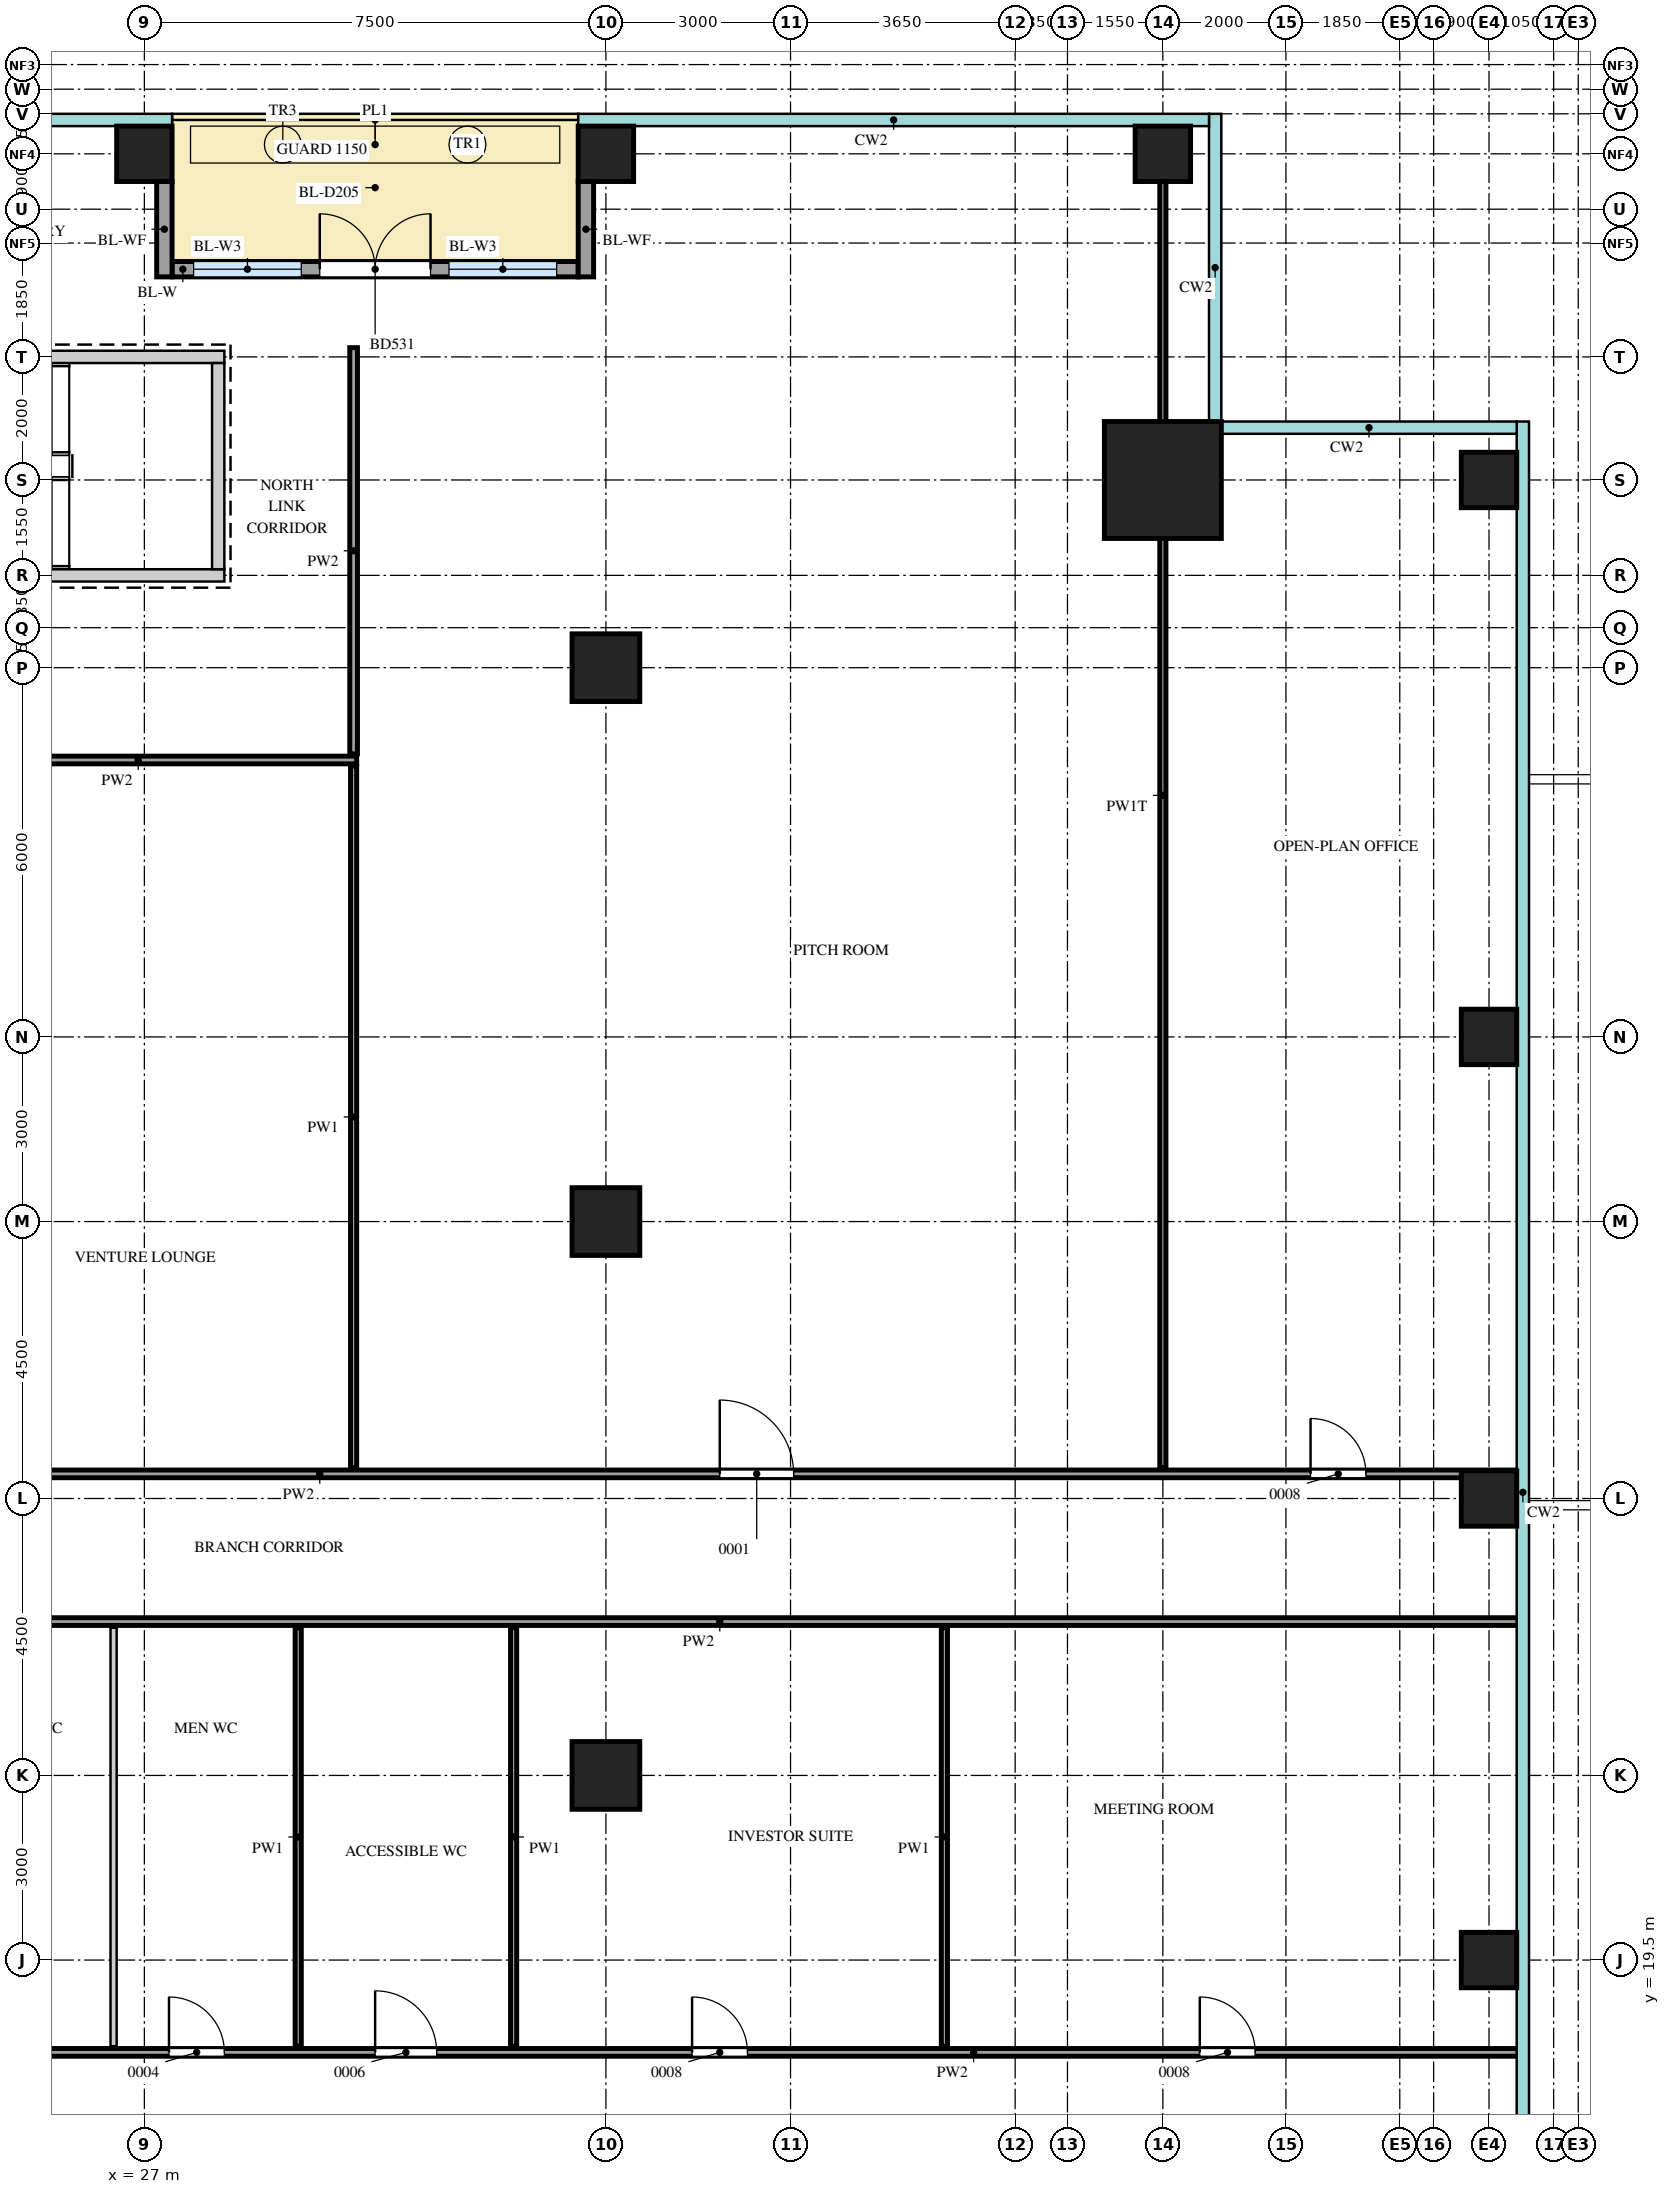
"""IFC4 building model, lengths in metres.
Left out: names, types, materials, properties, quantities, classifications, styles, units other than length and angle.
Written with IfcOpenShell. Run it as: python <this file> out.ifc"""

import sys

from ifc_helpers import new_model, si_unit, direction, frame, frame_2d, origin, origin_2d, place, context, subcontext, project, spatial, rectangle, extrude, source, transform, mapped, element, fill, save


model = new_model("IFC4")
c1 = context("Model", 3, precision=1e-05, world=origin(), true_north=direction((0.0, 1.0)))
c2 = subcontext(c1, "Body", "Model", "MODEL_VIEW")
j1 = project(units=[si_unit("LENGTHUNIT", "METRE"), si_unit("PLANEANGLEUNIT", "RADIAN")], contexts=[c1])
p1 = place(None, origin())
s1 = spatial("IfcSite", under=j1, at=p1, CompositionType="ELEMENT")
p2 = place(p1, origin())
s2 = spatial("IfcBuilding", under=s1, at=p2, CompositionType="ELEMENT")
p3 = place(p2, frame((0.0, 0.0, 238.2)))
s3 = spatial("IfcBuildingStorey", under=s2, at=p3, CompositionType="ELEMENT", Elevation=238.2)
m1 = source(origin(), c2, "Body", "SweptSolid", [
    extrude(rectangle(XDim=7.1, YDim=0.2, at=frame_2d((3.55, 0.0))), origin(), (0.0, 0.0, 1.0), 3.75),
])
p4 = place(p3, frame((21.2, 45.55, 0.0), z_axis=(0.0, 0.0, 1.0), x_axis=(1.0, 0.0, 0.0)))
e1 = element("IfcWall", 1, at=p4, inside=s3, PredefinedType="SHEAR", context=c2, shape_type="MappedRepresentation", body=[
    mapped(m1, transform((0.0, 0.0, 0.0))),
])
m2 = source(origin(), c2, "Body", "SweptSolid", [
    extrude(rectangle(XDim=1.2, YDim=2.1, at=frame_2d((0.6, 1.05))), frame((0.0, 0.11, 0.0), z_axis=(0.0, -1.0, 0.0), x_axis=(1.0, 0.0, 0.0)), (0.0, 0.0, 1.0), 0.22),
])
p5 = place(p4, frame((0.15, 0.0, 0.0)))
e2 = element("IfcOpeningElement", 2, at=p5, cuts=e1, PredefinedType="OPENING", context=c2, shape_type="MappedRepresentation", body=[
    mapped(m2, transform((0.0, 0.0, 0.0))),
])
p6 = place(p3, frame((21.2, 42.0, 0.0), z_axis=(0.0, 0.0, 1.0), x_axis=(1.0, 0.0, 0.0)))
e3 = element("IfcWall", 3, at=p6, inside=s3, PredefinedType="SHEAR", context=c2, shape_type="MappedRepresentation", body=[
    mapped(m1, transform((0.0, 0.0, 0.0))),
])
m3 = source(origin(), c2, "Body", "SweptSolid", [
    extrude(rectangle(XDim=3.35, YDim=0.2, at=frame_2d((1.675, 0.0))), origin(), (0.0, 0.0, 1.0), 3.75),
])
p7 = place(p3, frame((28.2, 42.1, 0.0), z_axis=(0.0, 0.0, 1.0), x_axis=(0.0, 1.0, 0.0)))
e4 = element("IfcWall", 4, at=p7, inside=s3, PredefinedType="SHEAR", context=c2, shape_type="MappedRepresentation", body=[
    mapped(m3, transform((0.0, 0.0, 0.0))),
])
m4 = source(origin(), c2, "Body", "SweptSolid", [
    extrude(rectangle(XDim=1.9, YDim=1.9, at=origin_2d()), origin(), (0.0, 0.0, 1.0), 4.0),
])
p8 = place(p3, frame((43.55, 43.55, 0.0), z_axis=(0.0, 0.0, 1.0), x_axis=(1.0, 0.0, 0.0)))
e5 = element("IfcColumn", 5, at=p8, inside=s3, PredefinedType="COLUMN", context=c2, shape_type="MappedRepresentation", body=[
    mapped(m4, transform((0.0, 0.0, 0.0))),
])
m5 = source(origin(), c2, "Body", "SweptSolid", [
    extrude(rectangle(XDim=0.9, YDim=0.9, at=origin_2d()), origin(), (0.0, 0.0, 1.0), 3.75),
])
for number, where, z_axis, x_axis in (
    (6, (48.85, 19.5, 0.0), (0.0, 0.0, 1.0), (1.0, 0.0, 0.0)),
    (7, (48.85, 27.0, 0.0), (0.0, 0.0, 1.0), (1.0, 0.0, 0.0)),
    (8, (48.85, 34.5, 0.0), (0.0, 0.0, 1.0), (1.0, 0.0, 0.0)),
    (9, (48.85, 43.55, 0.0), (0.0, 0.0, 1.0), (1.0, 0.0, 0.0)),
    (10, (27.0, 48.85, 0.0), (0.0, 0.0, 1.0), (1.0, 0.0, 0.0)),
    (11, (34.5, 48.85, 0.0), (0.0, 0.0, 1.0), (1.0, 0.0, 0.0)),
    (12, (43.55, 48.85, 0.0), (0.0, 0.0, 1.0), (1.0, 0.0, 0.0)),
):
    element("IfcColumn", number, at=place(p3, frame(where, z_axis=z_axis, x_axis=x_axis)), inside=s3, PredefinedType="COLUMN", context=c2, shape_type="MappedRepresentation", body=[
        mapped(m5, transform((0.0, 0.0, 0.0))),
    ])
m6 = source(origin(), c2, "Body", "SweptSolid", [
    extrude(rectangle(XDim=1.1, YDim=1.1, at=origin_2d()), origin(), (0.0, 0.0, 1.0), 3.75),
])
for number, where, z_axis, x_axis in (
    (13, (34.5, 22.5, 0.0), (0.0, 0.0, 1.0), (1.0, 0.0, 0.0)),
    (14, (34.5, 31.5, 0.0), (0.0, 0.0, 1.0), (1.0, 0.0, 0.0)),
    (15, (34.5, 40.5, 0.0), (0.0, 0.0, 1.0), (1.0, 0.0, 0.0)),
):
    element("IfcColumn", number, at=place(p3, frame(where, z_axis=z_axis, x_axis=x_axis)), inside=s3, PredefinedType="COLUMN", context=c2, shape_type="MappedRepresentation", body=[
        mapped(m6, transform((0.0, 0.0, 0.0))),
    ])
m7 = source(origin(), c2, "Body", "SweptSolid", [
    extrude(rectangle(XDim=6.6, YDim=0.25, at=frame_2d((3.3, 0.0))), origin(), (0.0, 0.0, 1.0), 3.75),
])
p9 = place(p3, frame((27.45, 46.975, 0.0), z_axis=(0.0, 0.0, 1.0), x_axis=(1.0, 0.0, 0.0)))
e16 = element("IfcWall", 16, at=p9, inside=s3, PredefinedType="SOLIDWALL", context=c2, shape_type="MappedRepresentation", body=[
    mapped(m7, transform((0.0, 0.0, 0.0))),
])
m8 = source(origin(), c2, "Body", "SweptSolid", [
    extrude(rectangle(XDim=1.75, YDim=2.4, at=frame_2d((0.875, 1.2))), frame((0.0, 0.135, 0.0), z_axis=(0.0, -1.0, 0.0), x_axis=(1.0, 0.0, 0.0)), (0.0, 0.0, 1.0), 0.27),
])
p10 = place(p9, frame((0.35, 0.0, 0.0)))
e17 = element("IfcOpeningElement", 17, at=p10, cuts=e16, PredefinedType="OPENING", context=c2, shape_type="MappedRepresentation", body=[
    mapped(m8, transform((0.0, 0.0, 0.0))),
])
p11 = place(p9, frame((4.5, 0.0, 0.0)))
e18 = element("IfcOpeningElement", 18, at=p11, cuts=e16, PredefinedType="OPENING", context=c2, shape_type="MappedRepresentation", body=[
    mapped(m8, transform((0.0, 0.0, 0.0))),
])
m9 = source(origin(), c2, "Body", "SweptSolid", [
    extrude(rectangle(XDim=1.8, YDim=2.4, at=frame_2d((0.9, 1.2))), frame((0.0, 0.135, 0.0), z_axis=(0.0, -1.0, 0.0), x_axis=(1.0, 0.0, 0.0)), (0.0, 0.0, 1.0), 0.27),
])
p12 = place(p9, frame((2.4, 0.0, 0.0)))
e19 = element("IfcOpeningElement", 19, at=p12, cuts=e16, PredefinedType="OPENING", context=c2, shape_type="MappedRepresentation", body=[
    mapped(m9, transform((0.0, 0.0, 0.0))),
])
m10 = source(origin(), c2, "Body", "SweptSolid", [
    extrude(rectangle(XDim=1.55, YDim=0.25, at=frame_2d((0.775, 0.0))), origin(), (0.0, 0.0, 1.0), 3.45),
])
for number, where, z_axis, x_axis in (
    (20, (27.325, 48.4, 0.0), (0.0, 0.0, 1.0), (0.0, -1.0, 0.0)),
    (21, (34.175, 48.4, 0.0), (0.0, 0.0, 1.0), (0.0, -1.0, 0.0)),
):
    element("IfcWall", number, at=place(p3, frame(where, z_axis=z_axis, x_axis=x_axis)), inside=s3, PredefinedType="SOLIDWALL", context=c2, shape_type="MappedRepresentation", body=[
        mapped(m10, transform((0.0, 0.0, 0.0))),
    ])
m11 = source(origin(), c2, "Body", "SweptSolid", [
    extrude(rectangle(XDim=26.0, YDim=0.125, at=frame_2d((13.0, 0.0))), origin(), (0.0, 0.0, 1.0), 3.8),
])
p13 = place(p3, frame((23.35, 18.0, 0.0), z_axis=(0.0, 0.0, 1.0), x_axis=(1.0, 0.0, 0.0)))
e22 = element("IfcWall", 22, at=p13, inside=s3, PredefinedType="PARTITIONING", context=c2, shape_type="MappedRepresentation", body=[
    mapped(m11, transform((0.0, 0.0, 0.0))),
])
m12 = source(origin(), c2, "Body", "SweptSolid", [
    extrude(rectangle(XDim=0.9, YDim=2.1, at=frame_2d((0.45, 1.05))), frame((0.0, 0.073, 0.0), z_axis=(0.0, -1.0, 0.0), x_axis=(1.0, 0.0, 0.0)), (0.0, 0.0, 1.0), 0.145),
])
p14 = place(p13, frame((4.05, 0.0, 0.0)))
e23 = element("IfcOpeningElement", 23, at=p14, cuts=e22, PredefinedType="OPENING", context=c2, shape_type="MappedRepresentation", body=[
    mapped(m12, transform((0.0, 0.0, 0.0))),
])
m13 = source(origin(), c2, "Body", "SweptSolid", [
    extrude(rectangle(XDim=1.0, YDim=2.1, at=frame_2d((0.5, 1.05))), frame((0.0, 0.073, 0.0), z_axis=(0.0, -1.0, 0.0), x_axis=(1.0, 0.0, 0.0)), (0.0, 0.0, 1.0), 0.145),
])
p15 = place(p13, frame((7.4, 0.0, 0.0)))
e24 = element("IfcOpeningElement", 24, at=p15, cuts=e22, PredefinedType="OPENING", context=c2, shape_type="MappedRepresentation", body=[
    mapped(m13, transform((0.0, 0.0, 0.0))),
])
p16 = place(p13, frame((12.55, 0.0, 0.0)))
e25 = element("IfcOpeningElement", 25, at=p16, cuts=e22, PredefinedType="OPENING", context=c2, shape_type="MappedRepresentation", body=[
    mapped(m12, transform((0.0, 0.0, 0.0))),
])
p17 = place(p13, frame((20.8, 0.0, 0.0)))
e26 = element("IfcOpeningElement", 26, at=p17, cuts=e22, PredefinedType="OPENING", context=c2, shape_type="MappedRepresentation", body=[
    mapped(m12, transform((0.0, 0.0, 0.0))),
])
m14 = source(origin(), c2, "Body", "SweptSolid", [
    extrude(rectangle(XDim=6.8, YDim=0.1, at=frame_2d((3.4, 0.0))), origin(), (0.0, 0.0, 1.0), 3.8),
])
for number, where, z_axis, x_axis in (
    (27, (26.5, 18.1, 0.0), (0.0, 0.0, 1.0), (0.0, 1.0, 0.0)),
    (28, (29.5, 18.1, 0.0), (0.0, 0.0, 1.0), (0.0, 1.0, 0.0)),
    (29, (33.0, 18.1, 0.0), (0.0, 0.0, 1.0), (0.0, 1.0, 0.0)),
    (30, (40.0, 18.1, 0.0), (0.0, 0.0, 1.0), (0.0, 1.0, 0.0)),
):
    element("IfcWall", number, at=place(p3, frame(where, z_axis=z_axis, x_axis=x_axis)), inside=s3, PredefinedType="PARTITIONING", context=c2, shape_type="MappedRepresentation", body=[
        mapped(m14, transform((0.0, 0.0, 0.0))),
    ])
p18 = place(p3, frame((23.35, 25.0, 0.0), z_axis=(0.0, 0.0, 1.0), x_axis=(1.0, 0.0, 0.0)))
e31 = element("IfcWall", 31, at=p18, inside=s3, PredefinedType="PARTITIONING", context=c2, shape_type="MappedRepresentation", body=[
    mapped(m11, transform((0.0, 0.0, 0.0))),
])
p19 = place(p3, frame((23.35, 27.4, 0.0), z_axis=(0.0, 0.0, 1.0), x_axis=(1.0, 0.0, 0.0)))
e32 = element("IfcWall", 32, at=p19, inside=s3, PredefinedType="PARTITIONING", context=c2, shape_type="MappedRepresentation", body=[
    mapped(m11, transform((0.0, 0.0, 0.0))),
])
m15 = source(origin(), c2, "Body", "SweptSolid", [
    extrude(rectangle(XDim=1.2, YDim=2.1, at=frame_2d((0.6, 1.05))), frame((0.0, 0.073, 0.0), z_axis=(0.0, -1.0, 0.0), x_axis=(1.0, 0.0, 0.0)), (0.0, 0.0, 1.0), 0.145),
])
p20 = place(p19, frame((13.0, 0.0, 0.0)))
e33 = element("IfcOpeningElement", 33, at=p20, cuts=e32, PredefinedType="OPENING", context=c2, shape_type="MappedRepresentation", body=[
    mapped(m15, transform((0.0, 0.0, 0.0))),
])
p21 = place(p19, frame((22.6, 0.0, 0.0)))
e34 = element("IfcOpeningElement", 34, at=p21, cuts=e32, PredefinedType="OPENING", context=c2, shape_type="MappedRepresentation", body=[
    mapped(m12, transform((0.0, 0.0, 0.0))),
])
m16 = source(origin(), c2, "Body", "SweptSolid", [
    extrude(rectangle(XDim=11.4, YDim=0.1, at=frame_2d((5.7, 0.0))), origin(), (0.0, 0.0, 1.0), 3.8),
])
p22 = place(p3, frame((30.4, 27.5, 0.0), z_axis=(0.0, 0.0, 1.0), x_axis=(0.0, 1.0, 0.0)))
e35 = element("IfcWall", 35, at=p22, inside=s3, PredefinedType="PARTITIONING", context=c2, shape_type="MappedRepresentation", body=[
    mapped(m16, transform((0.0, 0.0, 0.0))),
])
m17 = source(origin(), c2, "Body", "SweptSolid", [
    extrude(rectangle(XDim=21.85, YDim=0.1, at=frame_2d((10.925, 0.0))), origin(), (0.0, 0.0, 1.0), 3.3),
])
p23 = place(p3, frame((43.55, 27.5, 0.0), z_axis=(0.0, 0.0, 1.0), x_axis=(0.0, 1.0, 0.0)))
e36 = element("IfcWall", 36, at=p23, inside=s3, PredefinedType="PARTITIONING", context=c2, shape_type="MappedRepresentation", body=[
    mapped(m17, transform((0.0, 0.0, 0.0))),
])
m18 = source(origin(), c2, "Body", "SweptSolid", [
    extrude(rectangle(XDim=7.1, YDim=0.125, at=frame_2d((3.55, 0.0))), origin(), (0.0, 0.0, 1.0), 3.8),
])
p24 = place(p3, frame((23.35, 39.0, 0.0), z_axis=(0.0, 0.0, 1.0), x_axis=(1.0, 0.0, 0.0)))
e37 = element("IfcWall", 37, at=p24, inside=s3, PredefinedType="PARTITIONING", context=c2, shape_type="MappedRepresentation", body=[
    mapped(m18, transform((0.0, 0.0, 0.0))),
])
m19 = source(origin(), c2, "Body", "SweptSolid", [
    extrude(rectangle(XDim=6.6, YDim=0.125, at=frame_2d((3.3, 0.0))), origin(), (0.0, 0.0, 1.0), 3.8),
])
p25 = place(p3, frame((30.4, 39.1, 0.0), z_axis=(0.0, 0.0, 1.0), x_axis=(0.0, 1.0, 0.0)))
e38 = element("IfcWall", 38, at=p25, inside=s3, PredefinedType="PARTITIONING", context=c2, shape_type="MappedRepresentation", body=[
    mapped(m19, transform((0.0, 0.0, 0.0))),
])
m20 = source(origin(), c2, "Body", "SweptSolid", [
    extrude(rectangle(XDim=1.75, YDim=2.4, at=frame_2d((0.875, 1.2))), frame((0.0, 0.03, 0.0), z_axis=(0.0, -1.0, 0.0), x_axis=(1.0, 0.0, 0.0)), (0.0, 0.0, 1.0), 0.06),
])
p26 = place(p10, origin())
e39 = element("IfcWindow", 39, at=p26, inside=s3, PartitioningType="SINGLE_PANEL", PredefinedType="WINDOW", context=c2, shape_type="MappedRepresentation", body=[
    mapped(m20, transform((0.0, 0.0, 0.0))),
])
fill(e17, e39)
p27 = place(p11, origin())
e40 = element("IfcWindow", 40, at=p27, inside=s3, PartitioningType="SINGLE_PANEL", PredefinedType="WINDOW", context=c2, shape_type="MappedRepresentation", body=[
    mapped(m20, transform((0.0, 0.0, 0.0))),
])
fill(e18, e40)
m21 = source(origin(), c2, "Body", "SweptSolid", [
    extrude(rectangle(XDim=1.8, YDim=2.4, at=frame_2d((0.9, 1.2))), frame((0.0, 0.025, 0.0), z_axis=(0.0, -1.0, 0.0), x_axis=(1.0, 0.0, 0.0)), (0.0, 0.0, 1.0), 0.05),
])
p28 = place(p12, origin())
e41 = element("IfcDoor", 41, at=p28, inside=s3, OperationType="DOUBLE_DOOR_DOUBLE_SWING", PredefinedType="DOOR", context=c2, shape_type="MappedRepresentation", body=[
    mapped(m21, transform((0.0, 0.0, 0.0))),
])
fill(e19, e41)
m22 = source(origin(), c2, "Body", "SweptSolid", [
    extrude(rectangle(XDim=0.9, YDim=2.1, at=frame_2d((0.45, 1.05))), frame((0.0, 0.025, 0.0), z_axis=(0.0, -1.0, 0.0), x_axis=(1.0, 0.0, 0.0)), (0.0, 0.0, 1.0), 0.05),
])
p29 = place(p14, origin())
e42 = element("IfcDoor", 42, at=p29, inside=s3, OperationType="SINGLE_SWING_RIGHT", PredefinedType="DOOR", context=c2, shape_type="MappedRepresentation", body=[
    mapped(m22, transform((0.0, 0.0, 0.0))),
])
fill(e23, e42)
m23 = source(origin(), c2, "Body", "SweptSolid", [
    extrude(rectangle(XDim=1.0, YDim=2.1, at=frame_2d((0.5, 1.05))), frame((0.0, 0.025, 0.0), z_axis=(0.0, -1.0, 0.0), x_axis=(1.0, 0.0, 0.0)), (0.0, 0.0, 1.0), 0.05),
])
p30 = place(p15, origin())
e43 = element("IfcDoor", 43, at=p30, inside=s3, OperationType="SINGLE_SWING_RIGHT", PredefinedType="DOOR", context=c2, shape_type="MappedRepresentation", body=[
    mapped(m23, transform((0.0, 0.0, 0.0))),
])
fill(e24, e43)
p31 = place(p16, origin())
e44 = element("IfcDoor", 44, at=p31, inside=s3, OperationType="SINGLE_SWING_RIGHT", PredefinedType="DOOR", context=c2, shape_type="MappedRepresentation", body=[
    mapped(m22, transform((0.0, 0.0, 0.0))),
])
fill(e25, e44)
p32 = place(p17, origin())
e45 = element("IfcDoor", 45, at=p32, inside=s3, OperationType="SINGLE_SWING_RIGHT", PredefinedType="DOOR", context=c2, shape_type="MappedRepresentation", body=[
    mapped(m22, transform((0.0, 0.0, 0.0))),
])
fill(e26, e45)
m24 = source(origin(), c2, "Body", "SweptSolid", [
    extrude(rectangle(XDim=1.2, YDim=2.1, at=frame_2d((0.6, 1.05))), frame((0.0, 0.025, 0.0), z_axis=(0.0, -1.0, 0.0), x_axis=(1.0, 0.0, 0.0)), (0.0, 0.0, 1.0), 0.05),
])
p33 = place(p20, origin())
e46 = element("IfcDoor", 46, at=p33, inside=s3, OperationType="SINGLE_SWING_RIGHT", PredefinedType="DOOR", context=c2, shape_type="MappedRepresentation", body=[
    mapped(m24, transform((0.0, 0.0, 0.0))),
])
fill(e33, e46)
p34 = place(p21, origin())
e47 = element("IfcDoor", 47, at=p34, inside=s3, OperationType="SINGLE_SWING_RIGHT", PredefinedType="DOOR", context=c2, shape_type="MappedRepresentation", body=[
    mapped(m22, transform((0.0, 0.0, 0.0))),
])
fill(e34, e47)
save(model, sys.argv[1])
